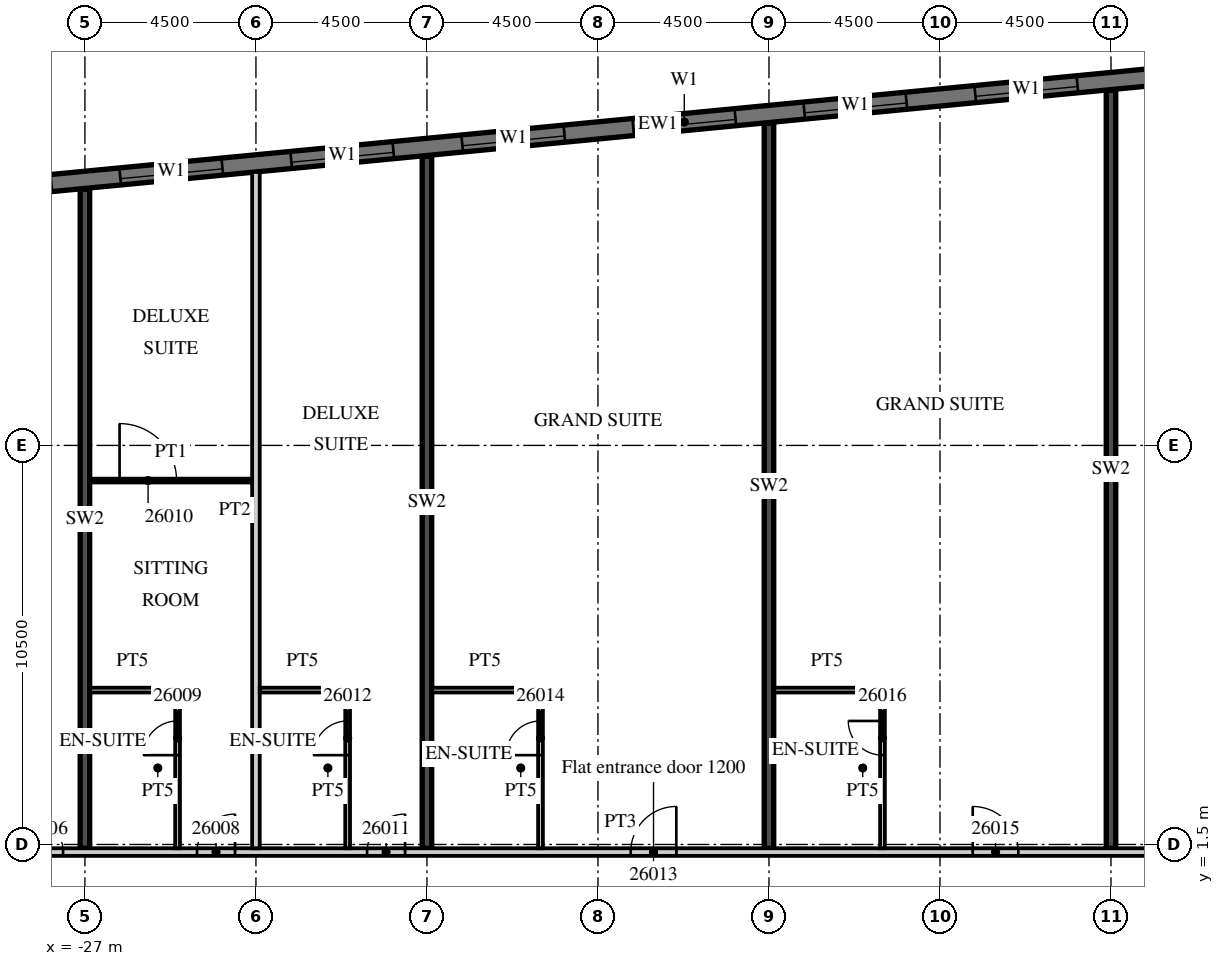
"""IFC4 building model, lengths in metres.
Left out: names, types, materials, properties, quantities, classifications, styles, units other than length and angle.
Written with IfcOpenShell. Run it as: python <this file> out.ifc"""

import sys

from ifc_helpers import new_model, si_unit, direction, frame, frame_2d, origin, place, context, subcontext, project, spatial, rectangle, extrude, element, fill, save


model = new_model("IFC4")
c1 = context("Model", 3, precision=1e-05, world=origin(), true_north=direction((0.0, 1.0)))
c2 = subcontext(c1, "Body", "Model", "MODEL_VIEW")
j1 = project(units=[si_unit("LENGTHUNIT", "METRE"), si_unit("PLANEANGLEUNIT", "RADIAN")], contexts=[c1])
p1 = place(None, origin())
s1 = spatial("IfcSite", under=j1, at=p1, CompositionType="ELEMENT")
p2 = place(p1, origin())
s2 = spatial("IfcBuilding", under=s1, at=p2, CompositionType="ELEMENT")
p3 = place(p2, frame((0.0, 0.0, 120.7)))
s3 = spatial("IfcBuildingStorey", under=s2, at=p3, CompositionType="ELEMENT", Elevation=120.7)
p4 = place(p3, frame((-27.0, 1.4, 0.0), z_axis=(0.0, 0.0, 1.0), x_axis=(0.0, 1.0, 0.0)))
e1 = element("IfcWall", 1, at=p4, inside=s3, PredefinedType="SHEAR", context=c2, shape_type="SweptSolid", body=[
    extrude(rectangle(XDim=17.34, YDim=0.25, at=frame_2d((8.67, 0.0))), origin(), (0.0, 0.0, 1.0), 3.3),
])
p5 = place(p3, frame((-18.0, 1.4, 0.0), z_axis=(0.0, 0.0, 1.0), x_axis=(0.0, 1.0, 0.0)))
e2 = element("IfcWall", 2, at=p5, inside=s3, PredefinedType="SHEAR", context=c2, shape_type="SweptSolid", body=[
    extrude(rectangle(XDim=18.207, YDim=0.25, at=frame_2d((9.104, 0.0))), origin(), (0.0, 0.0, 1.0), 3.3),
])
p6 = place(p3, frame((-9.0, 1.4, 0.0), z_axis=(0.0, 0.0, 1.0), x_axis=(0.0, 1.0, 0.0)))
e3 = element("IfcWall", 3, at=p6, inside=s3, PredefinedType="SHEAR", context=c2, shape_type="SweptSolid", body=[
    extrude(rectangle(XDim=19.073, YDim=0.25, at=frame_2d((9.537, 0.0))), origin(), (0.0, 0.0, 1.0), 3.3),
])
p7 = place(p3, frame((0.0, 1.4, 0.0), z_axis=(0.0, 0.0, 1.0), x_axis=(0.0, 1.0, 0.0)))
e4 = element("IfcWall", 4, at=p7, inside=s3, PredefinedType="SHEAR", context=c2, shape_type="SweptSolid", body=[
    extrude(rectangle(XDim=19.94, YDim=0.25, at=frame_2d((9.97, 0.0))), origin(), (0.0, 0.0, 1.0), 3.3),
])
p8 = place(p3, frame((13.521, 22.89, 0.0), z_axis=(0.0, 0.0, 1.0), x_axis=(-0.995396445054, -0.095843190545, 0.0)))
e5 = element("IfcWall", 5, at=p8, inside=s3, PredefinedType="SOLIDWALL", context=c2, shape_type="SweptSolid", body=[
    extrude(rectangle(XDim=51.114, YDim=0.45, at=frame_2d((25.557, 0.0))), origin(), (0.0, 0.0, 1.0), 3.02),
])
p9 = place(p8, frame((0.91, 0.0, 0.45)))
e6 = element("IfcOpeningElement", 6, at=p9, cuts=e5, PredefinedType="OPENING", context=c2, shape_type="SweptSolid", body=[
    extrude(rectangle(XDim=2.7, YDim=2.25, at=frame_2d((1.35, 1.125))), frame((0.0, 0.235, 0.0), z_axis=(0.0, -1.0, 0.0), x_axis=(1.0, 0.0, 0.0)), (0.0, 0.0, 1.0), 0.47),
])
p10 = place(p8, frame((5.431, 0.0, 0.45)))
e7 = element("IfcOpeningElement", 7, at=p10, cuts=e5, PredefinedType="OPENING", context=c2, shape_type="SweptSolid", body=[
    extrude(rectangle(XDim=2.7, YDim=2.25, at=frame_2d((1.35, 1.125))), frame((0.0, 0.235, 0.0), z_axis=(0.0, -1.0, 0.0), x_axis=(1.0, 0.0, 0.0)), (0.0, 0.0, 1.0), 0.47),
])
p11 = place(p8, frame((9.952, 0.0, 0.45)))
e8 = element("IfcOpeningElement", 8, at=p11, cuts=e5, PredefinedType="OPENING", context=c2, shape_type="SweptSolid", body=[
    extrude(rectangle(XDim=2.7, YDim=2.25, at=frame_2d((1.35, 1.125))), frame((0.0, 0.235, 0.0), z_axis=(0.0, -1.0, 0.0), x_axis=(1.0, 0.0, 0.0)), (0.0, 0.0, 1.0), 0.47),
])
p12 = place(p8, frame((14.473, 0.0, 0.45)))
e9 = element("IfcOpeningElement", 9, at=p12, cuts=e5, PredefinedType="OPENING", context=c2, shape_type="SweptSolid", body=[
    extrude(rectangle(XDim=2.7, YDim=2.25, at=frame_2d((1.35, 1.125))), frame((0.0, 0.235, 0.0), z_axis=(0.0, -1.0, 0.0), x_axis=(1.0, 0.0, 0.0)), (0.0, 0.0, 1.0), 0.47),
])
p13 = place(p8, frame((18.994, 0.0, 0.45)))
e10 = element("IfcOpeningElement", 10, at=p13, cuts=e5, PredefinedType="OPENING", context=c2, shape_type="SweptSolid", body=[
    extrude(rectangle(XDim=2.7, YDim=2.25, at=frame_2d((1.35, 1.125))), frame((0.0, 0.235, 0.0), z_axis=(0.0, -1.0, 0.0), x_axis=(1.0, 0.0, 0.0)), (0.0, 0.0, 1.0), 0.47),
])
p14 = place(p8, frame((23.514, 0.0, 0.45)))
e11 = element("IfcOpeningElement", 11, at=p14, cuts=e5, PredefinedType="OPENING", context=c2, shape_type="SweptSolid", body=[
    extrude(rectangle(XDim=2.7, YDim=2.25, at=frame_2d((1.35, 1.125))), frame((0.0, 0.235, 0.0), z_axis=(0.0, -1.0, 0.0), x_axis=(1.0, 0.0, 0.0)), (0.0, 0.0, 1.0), 0.47),
])
p15 = place(p8, frame((28.035, 0.0, 0.45)))
e12 = element("IfcOpeningElement", 12, at=p15, cuts=e5, PredefinedType="OPENING", context=c2, shape_type="SweptSolid", body=[
    extrude(rectangle(XDim=2.7, YDim=2.25, at=frame_2d((1.35, 1.125))), frame((0.0, 0.235, 0.0), z_axis=(0.0, -1.0, 0.0), x_axis=(1.0, 0.0, 0.0)), (0.0, 0.0, 1.0), 0.47),
])
p16 = place(p8, frame((32.556, 0.0, 0.45)))
e13 = element("IfcOpeningElement", 13, at=p16, cuts=e5, PredefinedType="OPENING", context=c2, shape_type="SweptSolid", body=[
    extrude(rectangle(XDim=2.7, YDim=2.25, at=frame_2d((1.35, 1.125))), frame((0.0, 0.235, 0.0), z_axis=(0.0, -1.0, 0.0), x_axis=(1.0, 0.0, 0.0)), (0.0, 0.0, 1.0), 0.47),
])
p17 = place(p8, frame((37.077, 0.0, 0.45)))
e14 = element("IfcOpeningElement", 14, at=p17, cuts=e5, PredefinedType="OPENING", context=c2, shape_type="SweptSolid", body=[
    extrude(rectangle(XDim=2.7, YDim=2.25, at=frame_2d((1.35, 1.125))), frame((0.0, 0.235, 0.0), z_axis=(0.0, -1.0, 0.0), x_axis=(1.0, 0.0, 0.0)), (0.0, 0.0, 1.0), 0.47),
])
p18 = place(p8, frame((41.598, 0.0, 0.45)))
e15 = element("IfcOpeningElement", 15, at=p18, cuts=e5, PredefinedType="OPENING", context=c2, shape_type="SweptSolid", body=[
    extrude(rectangle(XDim=2.7, YDim=2.25, at=frame_2d((1.35, 1.125))), frame((0.0, 0.235, 0.0), z_axis=(0.0, -1.0, 0.0), x_axis=(1.0, 0.0, 0.0)), (0.0, 0.0, 1.0), 0.47),
])
p19 = place(p8, frame((46.118, 0.0, 0.45)))
e16 = element("IfcOpeningElement", 16, at=p19, cuts=e5, PredefinedType="OPENING", context=c2, shape_type="SweptSolid", body=[
    extrude(rectangle(XDim=2.7, YDim=2.25, at=frame_2d((1.35, 1.125))), frame((0.0, 0.235, 0.0), z_axis=(0.0, -1.0, 0.0), x_axis=(1.0, 0.0, 0.0)), (0.0, 0.0, 1.0), 0.47),
])
p20 = place(p3, frame((-39.316, 1.3, 0.0), z_axis=(0.0, 0.0, 1.0), x_axis=(1.0, 0.0, 0.0)))
e17 = element("IfcWall", 17, at=p20, inside=s3, PredefinedType="PARTITIONING", context=c2, shape_type="SweptSolid", body=[
    extrude(rectangle(XDim=52.816, YDim=0.2, at=frame_2d((26.408, 0.0))), origin(), (0.0, 0.0, 1.0), 3.02),
])
p21 = place(p20, frame((0.15, 0.0, 0.0)))
e18 = element("IfcOpeningElement", 18, at=p21, cuts=e17, PredefinedType="OPENING", context=c2, shape_type="SweptSolid", body=[
    extrude(rectangle(XDim=0.9, YDim=2.1, at=frame_2d((0.45, 1.05))), frame((0.0, 0.11, 0.0), z_axis=(0.0, -1.0, 0.0), x_axis=(1.0, 0.0, 0.0)), (0.0, 0.0, 1.0), 0.22),
])
p22 = place(p20, frame((3.891, 0.0, 0.0)))
e19 = element("IfcOpeningElement", 19, at=p22, cuts=e17, PredefinedType="OPENING", context=c2, shape_type="SweptSolid", body=[
    extrude(rectangle(XDim=1.0, YDim=2.1, at=frame_2d((0.5, 1.05))), frame((0.0, 0.11, 0.0), z_axis=(0.0, -1.0, 0.0), x_axis=(1.0, 0.0, 0.0)), (0.0, 0.0, 1.0), 0.22),
])
p23 = place(p20, frame((10.741, 0.0, 0.0)))
e20 = element("IfcOpeningElement", 20, at=p23, cuts=e17, PredefinedType="OPENING", context=c2, shape_type="SweptSolid", body=[
    extrude(rectangle(XDim=1.0, YDim=2.1, at=frame_2d((0.5, 1.05))), frame((0.0, 0.11, 0.0), z_axis=(0.0, -1.0, 0.0), x_axis=(1.0, 0.0, 0.0)), (0.0, 0.0, 1.0), 0.22),
])
p24 = place(p20, frame((15.266, 0.0, 0.0)))
e21 = element("IfcOpeningElement", 21, at=p24, cuts=e17, PredefinedType="OPENING", context=c2, shape_type="SweptSolid", body=[
    extrude(rectangle(XDim=1.0, YDim=2.1, at=frame_2d((0.5, 1.05))), frame((0.0, 0.11, 0.0), z_axis=(0.0, -1.0, 0.0), x_axis=(1.0, 0.0, 0.0)), (0.0, 0.0, 1.0), 0.22),
])
p25 = place(p20, frame((19.741, 0.0, 0.0)))
e22 = element("IfcOpeningElement", 22, at=p25, cuts=e17, PredefinedType="OPENING", context=c2, shape_type="SweptSolid", body=[
    extrude(rectangle(XDim=1.0, YDim=2.1, at=frame_2d((0.5, 1.05))), frame((0.0, 0.11, 0.0), z_axis=(0.0, -1.0, 0.0), x_axis=(1.0, 0.0, 0.0)), (0.0, 0.0, 1.0), 0.22),
])
p26 = place(p20, frame((26.678, 0.0, 0.0)))
e23 = element("IfcOpeningElement", 23, at=p26, cuts=e17, PredefinedType="OPENING", context=c2, shape_type="SweptSolid", body=[
    extrude(rectangle(XDim=1.2, YDim=2.1, at=frame_2d((0.6, 1.05))), frame((0.0, 0.11, 0.0), z_axis=(0.0, -1.0, 0.0), x_axis=(1.0, 0.0, 0.0)), (0.0, 0.0, 1.0), 0.22),
])
p27 = place(p20, frame((35.678, 0.0, 0.0)))
e24 = element("IfcOpeningElement", 24, at=p27, cuts=e17, PredefinedType="OPENING", context=c2, shape_type="SweptSolid", body=[
    extrude(rectangle(XDim=1.2, YDim=2.1, at=frame_2d((0.6, 1.05))), frame((0.0, 0.11, 0.0), z_axis=(0.0, -1.0, 0.0), x_axis=(1.0, 0.0, 0.0)), (0.0, 0.0, 1.0), 0.22),
])
p28 = place(p20, frame((41.754, 0.0, 0.0)))
e25 = element("IfcOpeningElement", 25, at=p28, cuts=e17, PredefinedType="OPENING", context=c2, shape_type="SweptSolid", body=[
    extrude(rectangle(XDim=1.2, YDim=2.1, at=frame_2d((0.6, 1.05))), frame((0.0, 0.11, 0.0), z_axis=(0.0, -1.0, 0.0), x_axis=(1.0, 0.0, 0.0)), (0.0, 0.0, 1.0), 0.22),
])
p29 = place(p20, frame((51.241, 0.0, 0.0)))
e26 = element("IfcOpeningElement", 26, at=p29, cuts=e17, PredefinedType="OPENING", context=c2, shape_type="SweptSolid", body=[
    extrude(rectangle(XDim=1.0, YDim=2.1, at=frame_2d((0.5, 1.05))), frame((0.0, 0.11, 0.0), z_axis=(0.0, -1.0, 0.0), x_axis=(1.0, 0.0, 0.0)), (0.0, 0.0, 1.0), 0.22),
])
p30 = place(p3, frame((-22.5, 1.4, 0.0), z_axis=(0.0, 0.0, 1.0), x_axis=(0.0, 1.0, 0.0)))
e27 = element("IfcWall", 27, at=p30, inside=s3, PredefinedType="PARTITIONING", context=c2, shape_type="SweptSolid", body=[
    extrude(rectangle(XDim=17.796, YDim=0.2, at=frame_2d((8.898, 0.0))), origin(), (0.0, 0.0, 1.0), 3.02),
])
p31 = place(p3, frame((-24.562, 1.4, 0.0), z_axis=(0.0, 0.0, 1.0), x_axis=(0.0, 1.0, 0.0)))
e28 = element("IfcWall", 28, at=p31, inside=s3, PredefinedType="PARTITIONING", context=c2, shape_type="SweptSolid", body=[
    extrude(rectangle(XDim=4.225, YDim=0.125, at=frame_2d((2.113, 0.0))), origin(), (0.0, 0.0, 1.0), 3.02),
])
p32 = place(p31, frame((2.45, 0.0, 0.0)))
e29 = element("IfcOpeningElement", 29, at=p32, cuts=e28, PredefinedType="OPENING", context=c2, shape_type="SweptSolid", body=[
    extrude(rectangle(XDim=0.9, YDim=2.1, at=frame_2d((0.45, 1.05))), frame((0.0, 0.073, 0.0), z_axis=(0.0, -1.0, 0.0), x_axis=(1.0, 0.0, 0.0)), (0.0, 0.0, 1.0), 0.145),
])
p33 = place(p3, frame((-26.875, 5.562, 0.0), z_axis=(0.0, 0.0, 1.0), x_axis=(1.0, 0.0, 0.0)))
e30 = element("IfcWall", 30, at=p33, inside=s3, PredefinedType="PARTITIONING", context=c2, shape_type="SweptSolid", body=[
    extrude(rectangle(XDim=2.25, YDim=0.125, at=frame_2d((1.125, 0.0))), origin(), (0.0, 0.0, 1.0), 3.02),
])
p34 = place(p3, frame((-26.875, 11.075, 0.0), z_axis=(0.0, 0.0, 1.0), x_axis=(1.0, 0.0, 0.0)))
e31 = element("IfcWall", 31, at=p34, inside=s3, PredefinedType="PARTITIONING", context=c2, shape_type="SweptSolid", body=[
    extrude(rectangle(XDim=4.275, YDim=0.1, at=frame_2d((2.137, 0.0))), origin(), (0.0, 0.0, 1.0), 3.02),
])
p35 = place(p34, frame((0.787, 0.0, 0.0)))
e32 = element("IfcOpeningElement", 32, at=p35, cuts=e31, PredefinedType="OPENING", context=c2, shape_type="SweptSolid", body=[
    extrude(rectangle(XDim=1.5, YDim=2.1, at=frame_2d((0.75, 1.05))), frame((0.0, 0.06, 0.0), z_axis=(0.0, -1.0, 0.0), x_axis=(1.0, 0.0, 0.0)), (0.0, 0.0, 1.0), 0.12),
])
p36 = place(p3, frame((-20.087, 1.4, 0.0), z_axis=(0.0, 0.0, 1.0), x_axis=(0.0, 1.0, 0.0)))
e33 = element("IfcWall", 33, at=p36, inside=s3, PredefinedType="PARTITIONING", context=c2, shape_type="SweptSolid", body=[
    extrude(rectangle(XDim=4.225, YDim=0.125, at=frame_2d((2.113, 0.0))), origin(), (0.0, 0.0, 1.0), 3.02),
])
p37 = place(p36, frame((2.45, 0.0, 0.0)))
e34 = element("IfcOpeningElement", 34, at=p37, cuts=e33, PredefinedType="OPENING", context=c2, shape_type="SweptSolid", body=[
    extrude(rectangle(XDim=0.9, YDim=2.1, at=frame_2d((0.45, 1.05))), frame((0.0, 0.073, 0.0), z_axis=(0.0, -1.0, 0.0), x_axis=(1.0, 0.0, 0.0)), (0.0, 0.0, 1.0), 0.145),
])
p38 = place(p3, frame((-22.4, 5.562, 0.0), z_axis=(0.0, 0.0, 1.0), x_axis=(1.0, 0.0, 0.0)))
e35 = element("IfcWall", 35, at=p38, inside=s3, PredefinedType="PARTITIONING", context=c2, shape_type="SweptSolid", body=[
    extrude(rectangle(XDim=2.25, YDim=0.125, at=frame_2d((1.125, 0.0))), origin(), (0.0, 0.0, 1.0), 3.02),
])
p39 = place(p3, frame((-15.012, 1.4, 0.0), z_axis=(0.0, 0.0, 1.0), x_axis=(0.0, 1.0, 0.0)))
e36 = element("IfcWall", 36, at=p39, inside=s3, PredefinedType="PARTITIONING", context=c2, shape_type="SweptSolid", body=[
    extrude(rectangle(XDim=4.225, YDim=0.125, at=frame_2d((2.113, 0.0))), origin(), (0.0, 0.0, 1.0), 3.02),
])
p40 = place(p39, frame((2.45, 0.0, 0.0)))
e37 = element("IfcOpeningElement", 37, at=p40, cuts=e36, PredefinedType="OPENING", context=c2, shape_type="SweptSolid", body=[
    extrude(rectangle(XDim=0.9, YDim=2.1, at=frame_2d((0.45, 1.05))), frame((0.0, 0.073, 0.0), z_axis=(0.0, -1.0, 0.0), x_axis=(1.0, 0.0, 0.0)), (0.0, 0.0, 1.0), 0.145),
])
p41 = place(p3, frame((-17.875, 5.562, 0.0), z_axis=(0.0, 0.0, 1.0), x_axis=(1.0, 0.0, 0.0)))
e38 = element("IfcWall", 38, at=p41, inside=s3, PredefinedType="PARTITIONING", context=c2, shape_type="SweptSolid", body=[
    extrude(rectangle(XDim=2.8, YDim=0.125, at=frame_2d((1.4, 0.0))), origin(), (0.0, 0.0, 1.0), 3.02),
])
p42 = place(p3, frame((-6.013, 1.4, 0.0), z_axis=(0.0, 0.0, 1.0), x_axis=(0.0, 1.0, 0.0)))
e39 = element("IfcWall", 39, at=p42, inside=s3, PredefinedType="PARTITIONING", context=c2, shape_type="SweptSolid", body=[
    extrude(rectangle(XDim=4.225, YDim=0.125, at=frame_2d((2.113, 0.0))), origin(), (0.0, 0.0, 1.0), 3.02),
])
p43 = place(p42, frame((2.45, 0.0, 0.0)))
e40 = element("IfcOpeningElement", 40, at=p43, cuts=e39, PredefinedType="OPENING", context=c2, shape_type="SweptSolid", body=[
    extrude(rectangle(XDim=0.9, YDim=2.1, at=frame_2d((0.45, 1.05))), frame((0.0, 0.073, 0.0), z_axis=(0.0, -1.0, 0.0), x_axis=(1.0, 0.0, 0.0)), (0.0, 0.0, 1.0), 0.145),
])
p44 = place(p3, frame((-8.875, 5.562, 0.0), z_axis=(0.0, 0.0, 1.0), x_axis=(1.0, 0.0, 0.0)))
e41 = element("IfcWall", 41, at=p44, inside=s3, PredefinedType="PARTITIONING", context=c2, shape_type="SweptSolid", body=[
    extrude(rectangle(XDim=2.8, YDim=0.125, at=frame_2d((1.4, 0.0))), origin(), (0.0, 0.0, 1.0), 3.02),
])
p45 = place(p12, origin())
e42 = element("IfcWindow", 42, at=p45, inside=s3, PartitioningType="SINGLE_PANEL", PredefinedType="WINDOW", context=c2, shape_type="SweptSolid", body=[
    extrude(rectangle(XDim=2.7, YDim=2.25, at=frame_2d((1.35, 1.125))), frame((0.0, 0.09, 0.0), z_axis=(0.0, -1.0, 0.0), x_axis=(1.0, 0.0, 0.0)), (0.0, 0.0, 1.0), 0.06),
])
fill(e9, e42)
p46 = place(p13, origin())
e43 = element("IfcWindow", 43, at=p46, inside=s3, PartitioningType="SINGLE_PANEL", PredefinedType="WINDOW", context=c2, shape_type="SweptSolid", body=[
    extrude(rectangle(XDim=2.7, YDim=2.25, at=frame_2d((1.35, 1.125))), frame((0.0, 0.09, 0.0), z_axis=(0.0, -1.0, 0.0), x_axis=(1.0, 0.0, 0.0)), (0.0, 0.0, 1.0), 0.06),
])
fill(e10, e43)
p47 = place(p14, origin())
e44 = element("IfcWindow", 44, at=p47, inside=s3, PartitioningType="SINGLE_PANEL", PredefinedType="WINDOW", context=c2, shape_type="SweptSolid", body=[
    extrude(rectangle(XDim=2.7, YDim=2.25, at=frame_2d((1.35, 1.125))), frame((0.0, 0.09, 0.0), z_axis=(0.0, -1.0, 0.0), x_axis=(1.0, 0.0, 0.0)), (0.0, 0.0, 1.0), 0.06),
])
fill(e11, e44)
p48 = place(p15, origin())
e45 = element("IfcWindow", 45, at=p48, inside=s3, PartitioningType="SINGLE_PANEL", PredefinedType="WINDOW", context=c2, shape_type="SweptSolid", body=[
    extrude(rectangle(XDim=2.7, YDim=2.25, at=frame_2d((1.35, 1.125))), frame((0.0, 0.09, 0.0), z_axis=(0.0, -1.0, 0.0), x_axis=(1.0, 0.0, 0.0)), (0.0, 0.0, 1.0), 0.06),
])
fill(e12, e45)
p49 = place(p16, origin())
e46 = element("IfcWindow", 46, at=p49, inside=s3, PartitioningType="SINGLE_PANEL", PredefinedType="WINDOW", context=c2, shape_type="SweptSolid", body=[
    extrude(rectangle(XDim=2.7, YDim=2.25, at=frame_2d((1.35, 1.125))), frame((0.0, 0.09, 0.0), z_axis=(0.0, -1.0, 0.0), x_axis=(1.0, 0.0, 0.0)), (0.0, 0.0, 1.0), 0.06),
])
fill(e13, e46)
p50 = place(p17, origin())
e47 = element("IfcWindow", 47, at=p50, inside=s3, PartitioningType="SINGLE_PANEL", PredefinedType="WINDOW", context=c2, shape_type="SweptSolid", body=[
    extrude(rectangle(XDim=2.7, YDim=2.25, at=frame_2d((1.35, 1.125))), frame((0.0, 0.09, 0.0), z_axis=(0.0, -1.0, 0.0), x_axis=(1.0, 0.0, 0.0)), (0.0, 0.0, 1.0), 0.06),
])
fill(e14, e47)
p51 = place(p23, origin())
e48 = element("IfcDoor", 48, at=p51, inside=s3, OperationType="SINGLE_SWING_LEFT", PredefinedType="DOOR", context=c2, shape_type="SweptSolid", body=[
    extrude(rectangle(XDim=1.0, YDim=2.1, at=frame_2d((0.5, 1.05))), frame((0.0, 0.025, 0.0), z_axis=(0.0, -1.0, 0.0), x_axis=(1.0, 0.0, 0.0)), (0.0, 0.0, 1.0), 0.05),
])
fill(e20, e48)
p52 = place(p24, origin())
e49 = element("IfcDoor", 49, at=p52, inside=s3, OperationType="SINGLE_SWING_RIGHT", PredefinedType="DOOR", context=c2, shape_type="SweptSolid", body=[
    extrude(rectangle(XDim=1.0, YDim=2.1, at=frame_2d((0.5, 1.05))), frame((0.0, 0.025, 0.0), z_axis=(0.0, -1.0, 0.0), x_axis=(1.0, 0.0, 0.0)), (0.0, 0.0, 1.0), 0.05),
])
fill(e21, e49)
p53 = place(p32, origin())
e50 = element("IfcDoor", 50, at=p53, inside=s3, OperationType="SINGLE_SWING_LEFT", PredefinedType="DOOR", context=c2, shape_type="SweptSolid", body=[
    extrude(rectangle(XDim=0.9, YDim=2.1, at=frame_2d((0.45, 1.05))), frame((0.0, 0.025, 0.0), z_axis=(0.0, -1.0, 0.0), x_axis=(1.0, 0.0, 0.0)), (0.0, 0.0, 1.0), 0.05),
])
fill(e29, e50)
p54 = place(p35, origin())
e51 = element("IfcDoor", 51, at=p54, inside=s3, OperationType="SINGLE_SWING_LEFT", PredefinedType="DOOR", context=c2, shape_type="SweptSolid", body=[
    extrude(rectangle(XDim=1.5, YDim=2.1, at=frame_2d((0.75, 1.05))), frame((0.0, 0.025, 0.0), z_axis=(0.0, -1.0, 0.0), x_axis=(1.0, 0.0, 0.0)), (0.0, 0.0, 1.0), 0.05),
])
fill(e32, e51)
p55 = place(p25, origin())
e52 = element("IfcDoor", 52, at=p55, inside=s3, OperationType="SINGLE_SWING_RIGHT", PredefinedType="DOOR", context=c2, shape_type="SweptSolid", body=[
    extrude(rectangle(XDim=1.0, YDim=2.1, at=frame_2d((0.5, 1.05))), frame((0.0, 0.025, 0.0), z_axis=(0.0, -1.0, 0.0), x_axis=(1.0, 0.0, 0.0)), (0.0, 0.0, 1.0), 0.05),
])
fill(e22, e52)
p56 = place(p37, origin())
e53 = element("IfcDoor", 53, at=p56, inside=s3, OperationType="SINGLE_SWING_LEFT", PredefinedType="DOOR", context=c2, shape_type="SweptSolid", body=[
    extrude(rectangle(XDim=0.9, YDim=2.1, at=frame_2d((0.45, 1.05))), frame((0.0, 0.025, 0.0), z_axis=(0.0, -1.0, 0.0), x_axis=(1.0, 0.0, 0.0)), (0.0, 0.0, 1.0), 0.05),
])
fill(e34, e53)
p57 = place(p26, origin())
e54 = element("IfcDoor", 54, at=p57, inside=s3, OperationType="SINGLE_SWING_RIGHT", PredefinedType="DOOR", context=c2, shape_type="SweptSolid", body=[
    extrude(rectangle(XDim=1.2, YDim=2.1, at=frame_2d((0.6, 1.05))), frame((0.0, 0.025, 0.0), z_axis=(0.0, -1.0, 0.0), x_axis=(1.0, 0.0, 0.0)), (0.0, 0.0, 1.0), 0.05),
])
fill(e23, e54)
p58 = place(p40, origin())
e55 = element("IfcDoor", 55, at=p58, inside=s3, OperationType="SINGLE_SWING_LEFT", PredefinedType="DOOR", context=c2, shape_type="SweptSolid", body=[
    extrude(rectangle(XDim=0.9, YDim=2.1, at=frame_2d((0.45, 1.05))), frame((0.0, 0.025, 0.0), z_axis=(0.0, -1.0, 0.0), x_axis=(1.0, 0.0, 0.0)), (0.0, 0.0, 1.0), 0.05),
])
fill(e37, e55)
p59 = place(p27, origin())
e56 = element("IfcDoor", 56, at=p59, inside=s3, OperationType="SINGLE_SWING_LEFT", PredefinedType="DOOR", context=c2, shape_type="SweptSolid", body=[
    extrude(rectangle(XDim=1.2, YDim=2.1, at=frame_2d((0.6, 1.05))), frame((0.0, 0.025, 0.0), z_axis=(0.0, -1.0, 0.0), x_axis=(1.0, 0.0, 0.0)), (0.0, 0.0, 1.0), 0.05),
])
fill(e24, e56)
p60 = place(p43, origin())
e57 = element("IfcDoor", 57, at=p60, inside=s3, OperationType="SINGLE_SWING_RIGHT", PredefinedType="DOOR", context=c2, shape_type="SweptSolid", body=[
    extrude(rectangle(XDim=0.9, YDim=2.1, at=frame_2d((0.45, 1.05))), frame((0.0, 0.025, 0.0), z_axis=(0.0, -1.0, 0.0), x_axis=(1.0, 0.0, 0.0)), (0.0, 0.0, 1.0), 0.05),
])
fill(e40, e57)
save(model, sys.argv[1])
